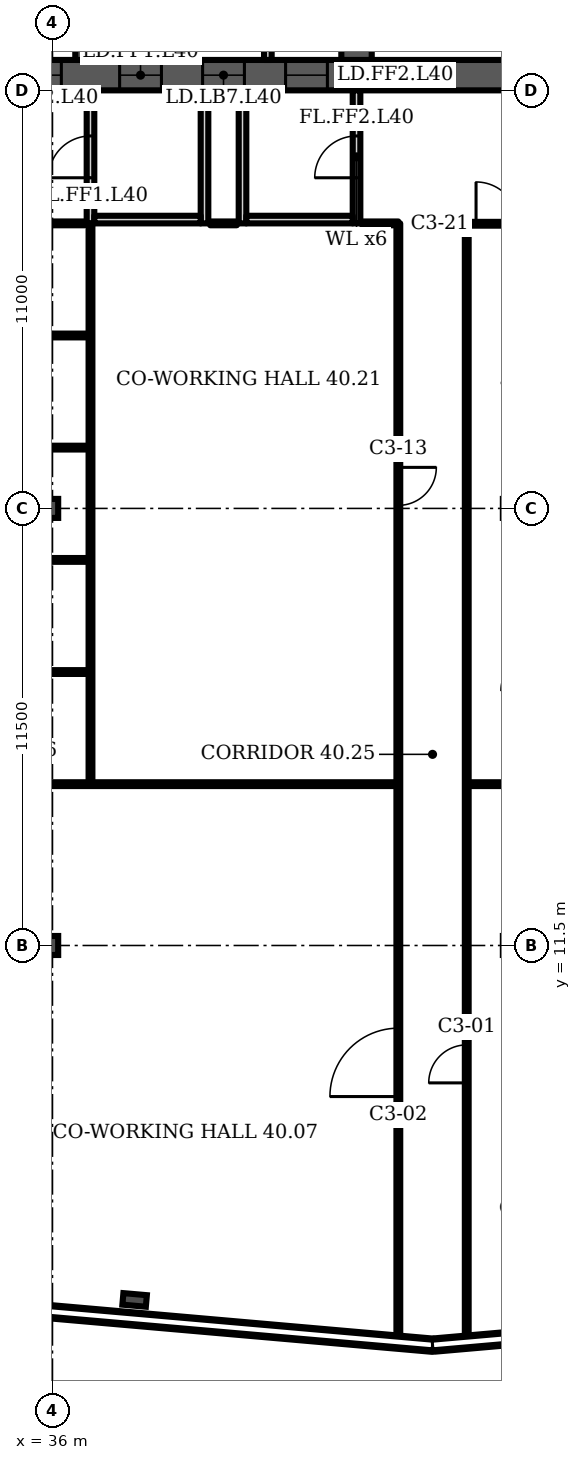
"""IFC4 building model, lengths in metres.
Left out: names, types, materials, properties, quantities, classifications, styles, units other than length and angle.
Written with IfcOpenShell. Run it as: python <this file> out.ifc"""

import sys

from ifc_helpers import new_model, si_unit, direction, frame, frame_2d, origin, origin_2d, place, context, subcontext, project, spatial, polyline, rectangle, i_section, outline, extrude, element, fill, save


model = new_model("IFC4")
c1 = context("Model", 3, precision=1e-05, world=origin(), true_north=direction((0.0, 1.0)))
c2 = subcontext(c1, "Body", "Model", "MODEL_VIEW")
j1 = project(units=[si_unit("LENGTHUNIT", "METRE"), si_unit("PLANEANGLEUNIT", "RADIAN")], contexts=[c1])
p1 = place(None, origin())
s1 = spatial("IfcSite", under=j1, at=p1, CompositionType="ELEMENT")
p2 = place(p1, origin())
s2 = spatial("IfcBuilding", under=s1, at=p2, CompositionType="ELEMENT")
p3 = place(p2, frame((0.0, 0.0, 166.3)))
s3 = spatial("IfcBuildingStorey", under=s2, at=p3, CompositionType="ELEMENT", Elevation=166.3)
p4 = place(p3, frame((16.0, 34.4, 0.0), z_axis=(0.0, 0.0, 1.0), x_axis=(1.0, 0.0, 0.0)))
e1 = element("IfcWall", 1, at=p4, inside=s3, PredefinedType="SHEAR", context=c2, shape_type="SweptSolid", body=[
    extrude(rectangle(XDim=42.0, YDim=0.8, at=frame_2d((21.0, 0.0))), origin(), (0.0, 0.0, 1.0), 3.6),
])
p5 = place(p4, frame((3.2, 0.0, 0.0)))
e2 = element("IfcOpeningElement", 2, at=p5, cuts=e1, PredefinedType="OPENING", context=c2, shape_type="SweptSolid", body=[
    extrude(rectangle(XDim=1.0, YDim=2.1, at=frame_2d((0.5, 1.05))), frame((0.0, 0.41, 0.0), z_axis=(0.0, -1.0, 0.0), x_axis=(1.0, 0.0, 0.0)), (0.0, 0.0, 1.0), 0.82),
])
p6 = place(p4, frame((7.65, 0.0, 0.0)))
e3 = element("IfcOpeningElement", 3, at=p6, cuts=e1, PredefinedType="OPENING", context=c2, shape_type="SweptSolid", body=[
    extrude(rectangle(XDim=1.2, YDim=2.1, at=frame_2d((0.6, 1.05))), frame((0.0, 0.41, 0.0), z_axis=(0.0, -1.0, 0.0), x_axis=(1.0, 0.0, 0.0)), (0.0, 0.0, 1.0), 0.82),
])
p7 = place(p4, frame((14.767, 0.0, 0.0)))
e4 = element("IfcOpeningElement", 4, at=p7, cuts=e1, PredefinedType="OPENING", context=c2, shape_type="SweptSolid", body=[
    extrude(rectangle(XDim=1.1, YDim=2.1, at=frame_2d((0.55, 1.05))), frame((0.0, 0.41, 0.0), z_axis=(0.0, -1.0, 0.0), x_axis=(1.0, 0.0, 0.0)), (0.0, 0.0, 1.0), 0.82),
])
p8 = place(p4, frame((19.133, 0.0, 0.0)))
e5 = element("IfcOpeningElement", 5, at=p8, cuts=e1, PredefinedType="OPENING", context=c2, shape_type="SweptSolid", body=[
    extrude(rectangle(XDim=1.1, YDim=2.1, at=frame_2d((0.55, 1.05))), frame((0.0, 0.41, 0.0), z_axis=(0.0, -1.0, 0.0), x_axis=(1.0, 0.0, 0.0)), (0.0, 0.0, 1.0), 0.82),
])
p9 = place(p4, frame((16.8, 0.0, 0.0)))
e6 = element("IfcOpeningElement", 6, at=p9, cuts=e1, PredefinedType="OPENING", context=c2, shape_type="SweptSolid", body=[
    extrude(rectangle(XDim=1.4, YDim=2.1, at=frame_2d((0.7, 1.05))), frame((0.0, 0.41, 0.0), z_axis=(0.0, -1.0, 0.0), x_axis=(1.0, 0.0, 0.0)), (0.0, 0.0, 1.0), 0.82),
])
p10 = place(p4, frame((21.767, 0.0, 0.0)))
e7 = element("IfcOpeningElement", 7, at=p10, cuts=e1, PredefinedType="OPENING", context=c2, shape_type="SweptSolid", body=[
    extrude(rectangle(XDim=1.1, YDim=2.1, at=frame_2d((0.55, 1.05))), frame((0.0, 0.41, 0.0), z_axis=(0.0, -1.0, 0.0), x_axis=(1.0, 0.0, 0.0)), (0.0, 0.0, 1.0), 0.82),
])
p11 = place(p4, frame((23.95, 0.0, 0.0)))
e8 = element("IfcOpeningElement", 8, at=p11, cuts=e1, PredefinedType="OPENING", context=c2, shape_type="SweptSolid", body=[
    extrude(rectangle(XDim=1.1, YDim=2.1, at=frame_2d((0.55, 1.05))), frame((0.0, 0.41, 0.0), z_axis=(0.0, -1.0, 0.0), x_axis=(1.0, 0.0, 0.0)), (0.0, 0.0, 1.0), 0.82),
])
p12 = place(p4, frame((26.133, 0.0, 0.0)))
e9 = element("IfcOpeningElement", 9, at=p12, cuts=e1, PredefinedType="OPENING", context=c2, shape_type="SweptSolid", body=[
    extrude(rectangle(XDim=1.1, YDim=2.1, at=frame_2d((0.55, 1.05))), frame((0.0, 0.41, 0.0), z_axis=(0.0, -1.0, 0.0), x_axis=(1.0, 0.0, 0.0)), (0.0, 0.0, 1.0), 0.82),
])
p13 = place(p4, frame((33.15, 0.0, 0.0)))
e10 = element("IfcOpeningElement", 10, at=p13, cuts=e1, PredefinedType="OPENING", context=c2, shape_type="SweptSolid", body=[
    extrude(rectangle(XDim=1.2, YDim=2.1, at=frame_2d((0.6, 1.05))), frame((0.0, 0.41, 0.0), z_axis=(0.0, -1.0, 0.0), x_axis=(1.0, 0.0, 0.0)), (0.0, 0.0, 1.0), 0.82),
])
p14 = place(p4, frame((35.817, 0.0, 0.0)))
e11 = element("IfcOpeningElement", 11, at=p14, cuts=e1, PredefinedType="OPENING", context=c2, shape_type="SweptSolid", body=[
    extrude(rectangle(XDim=1.0, YDim=2.1, at=frame_2d((0.5, 1.05))), frame((0.0, 0.41, 0.0), z_axis=(0.0, -1.0, 0.0), x_axis=(1.0, 0.0, 0.0)), (0.0, 0.0, 1.0), 0.82),
])
p15 = place(p4, frame((39.95, 0.0, 0.0)))
e12 = element("IfcOpeningElement", 12, at=p15, cuts=e1, PredefinedType="OPENING", context=c2, shape_type="SweptSolid", body=[
    extrude(rectangle(XDim=1.0, YDim=2.1, at=frame_2d((0.5, 1.05))), frame((0.0, 0.41, 0.0), z_axis=(0.0, -1.0, 0.0), x_axis=(1.0, 0.0, 0.0)), (0.0, 0.0, 1.0), 0.82),
])
p16 = place(p4, frame((37.767, 0.0, 0.0)))
e13 = element("IfcOpeningElement", 13, at=p16, cuts=e1, PredefinedType="OPENING", context=c2, shape_type="SweptSolid", body=[
    extrude(rectangle(XDim=1.4, YDim=2.1, at=frame_2d((0.7, 1.05))), frame((0.0, 0.41, 0.0), z_axis=(0.0, -1.0, 0.0), x_axis=(1.0, 0.0, 0.0)), (0.0, 0.0, 1.0), 0.82),
])
p17 = place(p3, frame((37.0, 34.8, 0.0), z_axis=(0.0, 0.0, 1.0), x_axis=(0.0, 1.0, 0.0)))
e14 = element("IfcWall", 14, at=p17, inside=s3, PredefinedType="SHEAR", context=c2, shape_type="SweptSolid", body=[
    extrude(rectangle(XDim=14.987, YDim=0.8, at=frame_2d((7.493, 0.0))), origin(), (0.0, 0.0, 1.0), 3.6),
])
p18 = place(p17, frame((11.312, 0.0, 0.0)))
e15 = element("IfcOpeningElement", 15, at=p18, cuts=e14, PredefinedType="OPENING", context=c2, shape_type="SweptSolid", body=[
    extrude(rectangle(XDim=1.0, YDim=2.1, at=frame_2d((0.5, 1.05))), frame((0.0, 0.41, 0.0), z_axis=(0.0, -1.0, 0.0), x_axis=(1.0, 0.0, 0.0)), (0.0, 0.0, 1.0), 0.82),
])
p19 = place(p17, frame((3.6, 0.0, 0.0)))
e16 = element("IfcOpeningElement", 16, at=p19, cuts=e14, PredefinedType="OPENING", context=c2, shape_type="SweptSolid", body=[
    extrude(rectangle(XDim=1.1, YDim=2.1, at=frame_2d((0.55, 1.05))), frame((0.0, 0.41, 0.0), z_axis=(0.0, -1.0, 0.0), x_axis=(1.0, 0.0, 0.0)), (0.0, 0.0, 1.0), 0.82),
])
p20 = place(p3, frame((44.0, 34.8, 0.0), z_axis=(0.0, 0.0, 1.0), x_axis=(0.0, 1.0, 0.0)))
e17 = element("IfcWall", 17, at=p20, inside=s3, PredefinedType="SHEAR", context=c2, shape_type="SweptSolid", body=[
    extrude(rectangle(XDim=14.374, YDim=0.8, at=frame_2d((7.187, 0.0))), origin(), (0.0, 0.0, 1.0), 3.6),
])
p21 = place(p20, frame((11.312, 0.0, 0.0)))
e18 = element("IfcOpeningElement", 18, at=p21, cuts=e17, PredefinedType="OPENING", context=c2, shape_type="SweptSolid", body=[
    extrude(rectangle(XDim=1.0, YDim=2.1, at=frame_2d((0.5, 1.05))), frame((0.0, 0.41, 0.0), z_axis=(0.0, -1.0, 0.0), x_axis=(1.0, 0.0, 0.0)), (0.0, 0.0, 1.0), 0.82),
])
p22 = place(p20, frame((3.6, 0.0, 0.0)))
e19 = element("IfcOpeningElement", 19, at=p22, cuts=e17, PredefinedType="OPENING", context=c2, shape_type="SweptSolid", body=[
    extrude(rectangle(XDim=1.1, YDim=2.1, at=frame_2d((0.55, 1.05))), frame((0.0, 0.41, 0.0), z_axis=(0.0, -1.0, 0.0), x_axis=(1.0, 0.0, 0.0)), (0.0, 0.0, 1.0), 0.82),
])
p23 = place(p3, frame((38.161, 2.174, 0.0), z_axis=(0.0, 0.0, 1.0), x_axis=(-0.087156, -0.996198, 0.0)))
e20 = element("IfcColumn", 20, at=p23, inside=s3, PredefinedType="COLUMN", context=c2, shape_type="SweptSolid", body=[
    extrude(i_section(OverallWidth=0.305, OverallDepth=0.62, WebThickness=0.021, FlangeThickness=0.04, FilletRadius=0.027, at=origin_2d()), origin(), (0.0, 0.0, 1.0), 3.6),
])
for number, where, z_axis, x_axis in (
    (21, (36.0, 11.5, 0.0), (0.0, 0.0, 1.0), (1.0, 0.0, 0.0)),
    (22, (36.0, 23.0, 0.0), (0.0, 0.0, 1.0), (1.0, 0.0, 0.0)),
):
    element("IfcColumn", number, at=place(p3, frame(where, z_axis=z_axis, x_axis=x_axis)), inside=s3, PredefinedType="COLUMN", context=c2, shape_type="SweptSolid", body=[
        extrude(i_section(OverallWidth=0.3, OverallDepth=0.5, WebThickness=0.014, FlangeThickness=0.028, FilletRadius=0.027, at=origin_2d()), origin(), (0.0, 0.0, 1.0), 3.6),
    ])
p24 = place(p3, frame((35.03, 1.943, 0.0), z_axis=(0.0, 0.0, 1.0), x_axis=(0.996199, -0.08714, 0.0)))
e23 = element("IfcWall", 23, at=p24, inside=s3, PredefinedType="SOLIDWALL", context=c2, shape_type="SweptSolid", body=[
    extrude(rectangle(XDim=11.028, YDim=0.35, at=frame_2d((5.514, 0.0))), origin(), (0.0, 0.0, 1.0), 1.0),
])
p25 = place(p3, frame((46.045, 0.987, 0.0), z_axis=(0.0, 0.0, 1.0), x_axis=(0.996193, 0.087171, 0.0)))
e24 = element("IfcWall", 24, at=p25, inside=s3, PredefinedType="SOLIDWALL", context=c2, shape_type="SweptSolid", body=[
    extrude(rectangle(XDim=11.11, YDim=0.35, at=frame_2d((5.555, 0.0))), origin(), (0.0, 0.0, 1.0), 1.0),
])
p26 = place(p3, frame((0.0, 0.0, -0.0)))
e25 = element("IfcWall", 25, at=p26, inside=s3, PredefinedType="PARTITIONING", context=c2, shape_type="SweptSolid", body=[
    extrude(outline(polyline([(34.567, 37.85), (34.767, 37.85), (36.6, 37.85), (36.6, 37.65), (34.767, 37.65), (34.767, 34.8), (34.567, 34.8), (34.567, 37.85)])), origin(), (0.0, 0.0, 1.0), 3.2),
])
p27 = place(p3, frame((0.0, 0.0, -0.0)))
e26 = element("IfcWall", 26, at=p27, inside=s3, PredefinedType="PARTITIONING", context=c2, shape_type="SweptSolid", body=[
    extrude(outline(polyline([(41.567, 37.1), (39.433, 37.1), (39.433, 34.8), (39.233, 34.8), (39.233, 37.65), (37.4, 37.65), (37.4, 37.85), (39.233, 37.85), (39.433, 37.85), (39.433, 37.3), (41.567, 37.3), (41.567, 37.55), (41.767, 37.55), (43.6, 37.55), (43.6, 37.35), (41.767, 37.35), (41.767, 34.8), (41.567, 34.8), (41.567, 37.1)])), origin(), (0.0, 0.0, 1.0), 3.2),
])
p28 = place(p3, frame((37.0, 30.5, 0.0), z_axis=(0.0, 0.0, 1.0), x_axis=(0.0, 1.0, 0.0)))
e27 = element("IfcWall", 27, at=p28, inside=s3, PredefinedType="PARTITIONING", context=c2, shape_type="SweptSolid", body=[
    extrude(rectangle(XDim=3.5, YDim=0.2, at=frame_2d((1.75, 0.0))), origin(), (0.0, 0.0, 1.0), 3.2),
])
p29 = place(p28, frame((1.2, 0.0, 0.0)))
e28 = element("IfcOpeningElement", 28, at=p29, cuts=e27, PredefinedType="OPENING", context=c2, shape_type="SweptSolid", body=[
    extrude(rectangle(XDim=1.1, YDim=2.1, at=frame_2d((0.55, 1.05))), frame((0.0, 0.11, 0.0), z_axis=(0.0, -1.0, 0.0), x_axis=(1.0, 0.0, 0.0)), (0.0, 0.0, 1.0), 0.22),
])
p30 = place(p3, frame((40.0, 30.5, 0.0), z_axis=(0.0, 0.0, 1.0), x_axis=(0.0, 1.0, 0.0)))
e29 = element("IfcWall", 29, at=p30, inside=s3, PredefinedType="PARTITIONING", context=c2, shape_type="SweptSolid", body=[
    extrude(rectangle(XDim=3.5, YDim=0.2, at=frame_2d((1.75, 0.0))), origin(), (0.0, 0.0, 1.0), 3.2),
])
p31 = place(p3, frame((37.1, 30.6, 0.0), z_axis=(0.0, 0.0, 1.0), x_axis=(1.0, 0.0, 0.0)))
e30 = element("IfcWall", 30, at=p31, inside=s3, PredefinedType="PARTITIONING", context=c2, shape_type="SweptSolid", body=[
    extrude(rectangle(XDim=2.8, YDim=0.2, at=frame_2d((1.4, 0.0))), origin(), (0.0, 0.0, 1.0), 3.2),
])
p32 = place(p3, frame((41.0, 30.5, 0.0), z_axis=(0.0, 0.0, 1.0), x_axis=(0.0, 1.0, 0.0)))
e31 = element("IfcWall", 31, at=p32, inside=s3, PredefinedType="PARTITIONING", context=c2, shape_type="SweptSolid", body=[
    extrude(rectangle(XDim=3.5, YDim=0.2, at=frame_2d((1.75, 0.0))), origin(), (0.0, 0.0, 1.0), 3.2),
])
p33 = place(p3, frame((44.0, 30.5, 0.0), z_axis=(0.0, 0.0, 1.0), x_axis=(0.0, 1.0, 0.0)))
e32 = element("IfcWall", 32, at=p33, inside=s3, PredefinedType="PARTITIONING", context=c2, shape_type="SweptSolid", body=[
    extrude(rectangle(XDim=3.5, YDim=0.2, at=frame_2d((1.75, 0.0))), origin(), (0.0, 0.0, 1.0), 3.2),
])
p34 = place(p33, frame((1.2, 0.0, 0.0)))
e33 = element("IfcOpeningElement", 33, at=p34, cuts=e32, PredefinedType="OPENING", context=c2, shape_type="SweptSolid", body=[
    extrude(rectangle(XDim=1.1, YDim=2.1, at=frame_2d((0.55, 1.05))), frame((0.0, 0.11, 0.0), z_axis=(0.0, -1.0, 0.0), x_axis=(1.0, 0.0, 0.0)), (0.0, 0.0, 1.0), 0.22),
])
p35 = place(p3, frame((41.1, 30.6, 0.0), z_axis=(0.0, 0.0, 1.0), x_axis=(1.0, 0.0, 0.0)))
e34 = element("IfcWall", 34, at=p35, inside=s3, PredefinedType="PARTITIONING", context=c2, shape_type="SweptSolid", body=[
    extrude(rectangle(XDim=2.8, YDim=0.2, at=frame_2d((1.4, 0.0))), origin(), (0.0, 0.0, 1.0), 3.2),
])
p36 = place(p3, frame((27.4, 15.745, 0.0), z_axis=(0.0, 0.0, 1.0), x_axis=(1.0, 0.0, 0.0)))
e35 = element("IfcWall", 35, at=p36, inside=s3, PredefinedType="PARTITIONING", context=c2, shape_type="SweptSolid", body=[
    extrude(rectangle(XDim=17.7, YDim=0.1, at=frame_2d((8.85, 0.0))), origin(), (0.0, 0.0, 1.0), 3.2),
])
for number, where, z_axis, x_axis in (
    (36, (27.4, 18.695, 0.0), (0.0, 0.0, 1.0), (1.0, 0.0, 0.0)),
    (37, (27.4, 21.645, 0.0), (0.0, 0.0, 1.0), (1.0, 0.0, 0.0)),
    (38, (27.4, 24.6, 0.0), (0.0, 0.0, 1.0), (1.0, 0.0, 0.0)),
    (39, (27.4, 27.55, 0.0), (0.0, 0.0, 1.0), (1.0, 0.0, 0.0)),
):
    element("IfcWall", number, at=place(p3, frame(where, z_axis=z_axis, x_axis=x_axis)), inside=s3, PredefinedType="PARTITIONING", context=c2, shape_type="SweptSolid", body=[
        extrude(rectangle(XDim=9.6, YDim=0.1, at=frame_2d((4.8, 0.0))), origin(), (0.0, 0.0, 1.0), 3.2),
    ])
p37 = place(p3, frame((27.4, 30.5, 0.0), z_axis=(0.0, 0.0, 1.0), x_axis=(1.0, 0.0, 0.0)))
e40 = element("IfcWall", 40, at=p37, inside=s3, PredefinedType="PARTITIONING", context=c2, shape_type="SweptSolid", body=[
    extrude(rectangle(XDim=9.45, YDim=0.1, at=frame_2d((4.725, 0.0))), origin(), (0.0, 0.0, 1.0), 3.2),
])
p38 = place(p37, frame((2.87, 0.0, 0.0)))
e41 = element("IfcOpeningElement", 41, at=p38, cuts=e40, PredefinedType="OPENING", context=c2, shape_type="SweptSolid", body=[
    extrude(rectangle(XDim=1.0, YDim=2.1, at=frame_2d((0.5, 1.05))), frame((0.0, 0.06, 0.0), z_axis=(0.0, -1.0, 0.0), x_axis=(1.0, 0.0, 0.0)), (0.0, 0.0, 1.0), 0.12),
])
p39 = place(p3, frame((37.0, 15.745, 0.0), z_axis=(0.0, 0.0, 1.0), x_axis=(0.0, 1.0, 0.0)))
e42 = element("IfcWall", 42, at=p39, inside=s3, PredefinedType="PARTITIONING", context=c2, shape_type="SweptSolid", body=[
    extrude(rectangle(XDim=14.755, YDim=0.1, at=frame_2d((7.377, 0.0))), origin(), (0.0, 0.0, 1.0), 3.2),
])
p40 = place(p3, frame((45.1, 1.087, 0.0), z_axis=(0.0, 0.0, 1.0), x_axis=(0.0, 1.0, 0.0)))
e43 = element("IfcWall", 43, at=p40, inside=s3, PredefinedType="PARTITIONING", context=c2, shape_type="SweptSolid", body=[
    extrude(rectangle(XDim=29.413, YDim=0.1, at=frame_2d((14.707, 0.0))), origin(), (0.0, 0.0, 1.0), 3.2),
])
p41 = place(p40, frame((6.438, 0.0, 0.0)))
e44 = element("IfcOpeningElement", 44, at=p41, cuts=e43, PredefinedType="OPENING", context=c2, shape_type="SweptSolid", body=[
    extrude(rectangle(XDim=1.8, YDim=2.1, at=frame_2d((0.9, 1.05))), frame((0.0, 0.06, 0.0), z_axis=(0.0, -1.0, 0.0), x_axis=(1.0, 0.0, 0.0)), (0.0, 0.0, 1.0), 0.12),
])
p42 = place(p40, frame((21.993, 0.0, 0.0)))
e45 = element("IfcOpeningElement", 45, at=p42, cuts=e43, PredefinedType="OPENING", context=c2, shape_type="SweptSolid", body=[
    extrude(rectangle(XDim=1.0, YDim=2.1, at=frame_2d((0.5, 1.05))), frame((0.0, 0.06, 0.0), z_axis=(0.0, -1.0, 0.0), x_axis=(1.0, 0.0, 0.0)), (0.0, 0.0, 1.0), 0.12),
])
p43 = place(p3, frame((46.9, 1.087, 0.0), z_axis=(0.0, 0.0, 1.0), x_axis=(0.0, 1.0, 0.0)))
e46 = element("IfcWall", 46, at=p43, inside=s3, PredefinedType="PARTITIONING", context=c2, shape_type="SweptSolid", body=[
    extrude(rectangle(XDim=29.403, YDim=0.1, at=frame_2d((14.702, 0.0))), origin(), (0.0, 0.0, 1.0), 3.2),
])
p44 = place(p43, frame((6.798, 0.0, 0.0)))
e47 = element("IfcOpeningElement", 47, at=p44, cuts=e46, PredefinedType="OPENING", context=c2, shape_type="SweptSolid", body=[
    extrude(rectangle(XDim=1.0, YDim=2.1, at=frame_2d((0.5, 1.05))), frame((0.0, 0.06, 0.0), z_axis=(0.0, -1.0, 0.0), x_axis=(1.0, 0.0, 0.0)), (0.0, 0.0, 1.0), 0.12),
])
p45 = place(p3, frame((46.91, 15.745, 0.0), z_axis=(0.0, 0.0, 1.0), x_axis=(1.0, 0.0, 0.0)))
e48 = element("IfcWall", 48, at=p45, inside=s3, PredefinedType="PARTITIONING", context=c2, shape_type="SweptSolid", body=[
    extrude(rectangle(XDim=17.69, YDim=0.1, at=frame_2d((8.845, 0.0))), origin(), (0.0, 0.0, 1.0), 3.2),
])
p46 = place(p3, frame((46.91, 30.49, 0.0), z_axis=(0.0, 0.0, 1.0), x_axis=(1.0, 0.0, 0.0)))
e49 = element("IfcWall", 49, at=p46, inside=s3, PredefinedType="PARTITIONING", context=c2, shape_type="SweptSolid", body=[
    extrude(rectangle(XDim=11.09, YDim=0.1, at=frame_2d((5.545, 0.0))), origin(), (0.0, 0.0, 1.0), 3.2),
])
p47 = place(p46, frame((0.235, 0.0, 0.0)))
e50 = element("IfcOpeningElement", 50, at=p47, cuts=e49, PredefinedType="OPENING", context=c2, shape_type="SweptSolid", body=[
    extrude(rectangle(XDim=1.1, YDim=2.1, at=frame_2d((0.55, 1.05))), frame((0.0, 0.06, 0.0), z_axis=(0.0, -1.0, 0.0), x_axis=(1.0, 0.0, 0.0)), (0.0, 0.0, 1.0), 0.12),
])
p48 = place(p3, frame((40.15, 30.5, 0.0), z_axis=(0.0, 0.0, 1.0), x_axis=(1.0, 0.0, 0.0)))
e51 = element("IfcWall", 51, at=p48, inside=s3, PredefinedType="PARTITIONING", context=c2, shape_type="SweptSolid", body=[
    extrude(rectangle(XDim=0.7, YDim=0.1, at=frame_2d((0.35, 0.0))), origin(), (0.0, 0.0, 1.0), 3.2),
])
p49 = place(p3, frame((44.15, 30.5, 0.0), z_axis=(0.0, 0.0, 1.0), x_axis=(1.0, 0.0, 0.0)))
e52 = element("IfcWall", 52, at=p49, inside=s3, PredefinedType="PARTITIONING", context=c2, shape_type="SweptSolid", body=[
    extrude(rectangle(XDim=0.95, YDim=0.1, at=frame_2d((0.475, 0.0))), origin(), (0.0, 0.0, 1.0), 3.2),
])
p50 = place(p8, origin())
e53 = element("IfcDoor", 53, at=p50, inside=s3, OperationType="DOUBLE_DOOR_SLIDING", PredefinedType="DOOR", context=c2, shape_type="SweptSolid", body=[
    extrude(rectangle(XDim=1.1, YDim=2.1, at=frame_2d((0.55, 1.05))), frame((0.0, 0.025, 0.0), z_axis=(0.0, -1.0, 0.0), x_axis=(1.0, 0.0, 0.0)), (0.0, 0.0, 1.0), 0.05),
])
fill(e5, e53)
p51 = place(p10, origin())
e54 = element("IfcDoor", 54, at=p51, inside=s3, OperationType="DOUBLE_DOOR_SLIDING", PredefinedType="DOOR", context=c2, shape_type="SweptSolid", body=[
    extrude(rectangle(XDim=1.1, YDim=2.1, at=frame_2d((0.55, 1.05))), frame((0.0, 0.025, 0.0), z_axis=(0.0, -1.0, 0.0), x_axis=(1.0, 0.0, 0.0)), (0.0, 0.0, 1.0), 0.05),
])
fill(e7, e54)
p52 = place(p11, origin())
e55 = element("IfcDoor", 55, at=p52, inside=s3, OperationType="DOUBLE_DOOR_SLIDING", PredefinedType="DOOR", context=c2, shape_type="SweptSolid", body=[
    extrude(rectangle(XDim=1.1, YDim=2.1, at=frame_2d((0.55, 1.05))), frame((0.0, 0.025, 0.0), z_axis=(0.0, -1.0, 0.0), x_axis=(1.0, 0.0, 0.0)), (0.0, 0.0, 1.0), 0.05),
])
fill(e8, e55)
p53 = place(p12, origin())
e56 = element("IfcDoor", 56, at=p53, inside=s3, OperationType="DOUBLE_DOOR_SLIDING", PredefinedType="DOOR", context=c2, shape_type="SweptSolid", body=[
    extrude(rectangle(XDim=1.1, YDim=2.1, at=frame_2d((0.55, 1.05))), frame((0.0, 0.025, 0.0), z_axis=(0.0, -1.0, 0.0), x_axis=(1.0, 0.0, 0.0)), (0.0, 0.0, 1.0), 0.05),
])
fill(e9, e56)
p54 = place(p29, origin())
e57 = element("IfcDoor", 57, at=p54, inside=s3, OperationType="SINGLE_SWING_LEFT", PredefinedType="DOOR", context=c2, shape_type="SweptSolid", body=[
    extrude(rectangle(XDim=1.1, YDim=2.1, at=frame_2d((0.55, 1.05))), frame((0.0, 0.025, 0.0), z_axis=(0.0, -1.0, 0.0), x_axis=(1.0, 0.0, 0.0)), (0.0, 0.0, 1.0), 0.05),
])
fill(e28, e57)
p55 = place(p34, origin())
e58 = element("IfcDoor", 58, at=p55, inside=s3, OperationType="SINGLE_SWING_LEFT", PredefinedType="DOOR", context=c2, shape_type="SweptSolid", body=[
    extrude(rectangle(XDim=1.1, YDim=2.1, at=frame_2d((0.55, 1.05))), frame((0.0, 0.025, 0.0), z_axis=(0.0, -1.0, 0.0), x_axis=(1.0, 0.0, 0.0)), (0.0, 0.0, 1.0), 0.05),
])
fill(e33, e58)
p56 = place(p44, origin())
e59 = element("IfcDoor", 59, at=p56, inside=s3, OperationType="SINGLE_SWING_LEFT", PredefinedType="DOOR", context=c2, shape_type="SweptSolid", body=[
    extrude(rectangle(XDim=1.0, YDim=2.1, at=frame_2d((0.5, 1.05))), frame((0.0, 0.025, 0.0), z_axis=(0.0, -1.0, 0.0), x_axis=(1.0, 0.0, 0.0)), (0.0, 0.0, 1.0), 0.05),
])
fill(e47, e59)
p57 = place(p41, origin())
e60 = element("IfcDoor", 60, at=p57, inside=s3, OperationType="DOUBLE_DOOR_SINGLE_SWING", PredefinedType="DOOR", context=c2, shape_type="SweptSolid", body=[
    extrude(rectangle(XDim=1.8, YDim=2.1, at=frame_2d((0.9, 1.05))), frame((0.0, 0.025, 0.0), z_axis=(0.0, -1.0, 0.0), x_axis=(1.0, 0.0, 0.0)), (0.0, 0.0, 1.0), 0.05),
])
fill(e44, e60)
p58 = place(p42, origin())
e61 = element("IfcDoor", 61, at=p58, inside=s3, OperationType="SINGLE_SWING_RIGHT", PredefinedType="DOOR", context=c2, shape_type="SweptSolid", body=[
    extrude(rectangle(XDim=1.0, YDim=2.1, at=frame_2d((0.5, 1.05))), frame((0.0, 0.025, 0.0), z_axis=(0.0, -1.0, 0.0), x_axis=(1.0, 0.0, 0.0)), (0.0, 0.0, 1.0), 0.05),
])
fill(e45, e61)
p59 = place(p47, origin())
e62 = element("IfcDoor", 62, at=p59, inside=s3, OperationType="SINGLE_SWING_LEFT", PredefinedType="DOOR", context=c2, shape_type="SweptSolid", body=[
    extrude(rectangle(XDim=1.1, YDim=2.1, at=frame_2d((0.55, 1.05))), frame((0.0, 0.025, 0.0), z_axis=(0.0, -1.0, 0.0), x_axis=(1.0, 0.0, 0.0)), (0.0, 0.0, 1.0), 0.05),
])
fill(e50, e62)
save(model, sys.argv[1])
